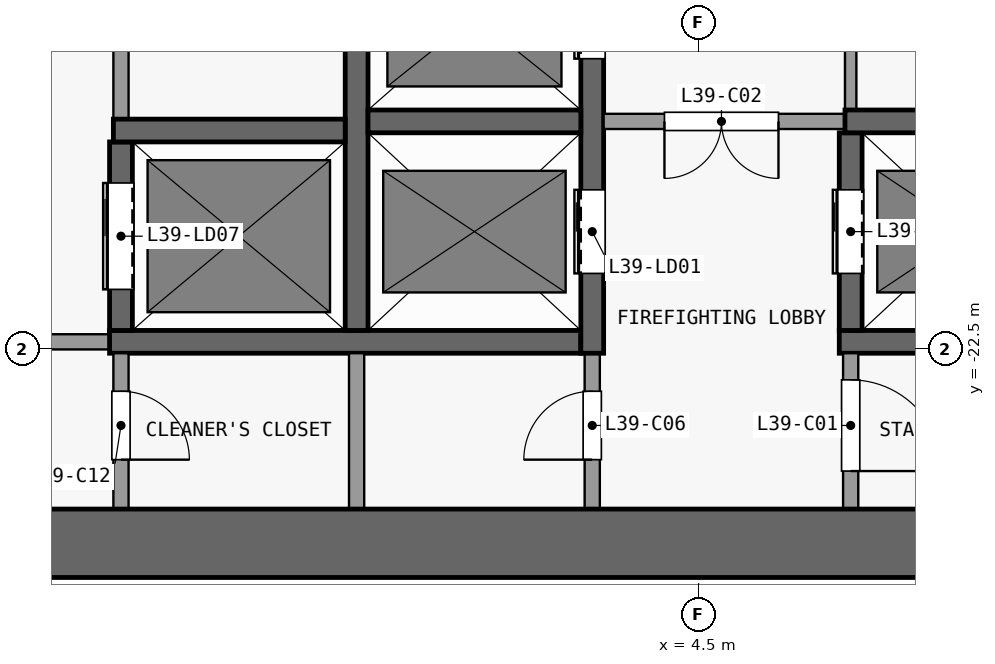
"""IFC4 building model, lengths in metres.
Left out: names, types, materials, properties, quantities, classifications, styles, units other than length and angle.
Written with IfcOpenShell. Run it as: python <this file> out.ifc"""

import sys

from ifc_helpers import new_model, si_unit, direction, frame, frame_2d, origin, place, context, subcontext, project, spatial, rectangle, extrude, element, fill, save


model = new_model("IFC4")
c1 = context("Model", 3, precision=1e-05, world=origin(), true_north=direction((0.0, 1.0)))
c2 = subcontext(c1, "Body", "Model", "MODEL_VIEW")
j1 = project(units=[si_unit("LENGTHUNIT", "METRE"), si_unit("PLANEANGLEUNIT", "RADIAN")], contexts=[c1])
p1 = place(None, origin())
s1 = spatial("IfcSite", under=j1, at=p1, CompositionType="ELEMENT")
p2 = place(p1, origin())
s2 = spatial("IfcBuilding", under=s1, at=p2, CompositionType="ELEMENT")
p3 = place(p2, frame((0.0, 0.0, 160.1)))
s3 = spatial("IfcBuildingStorey", under=s2, at=p3, CompositionType="ELEMENT", Elevation=160.1)
p4 = place(p3, frame((-13.3, -25.05, 0.0), z_axis=(0.0, 0.0, 1.0), x_axis=(1.0, 0.0, 0.0)))
e1 = element("IfcWall", 1, at=p4, inside=s3, PredefinedType="SHEAR", context=c2, shape_type="SweptSolid", body=[
    extrude(rectangle(XDim=26.6, YDim=0.9, at=frame_2d((13.3, 0.0))), origin(), (0.0, 0.0, 1.0), 3.3),
])
p5 = place(p3, frame((-3.25, -22.4, 0.0), z_axis=(0.0, 0.0, 1.0), x_axis=(-1.0, 0.0, 0.0)))
e2 = element("IfcWall", 2, at=p5, inside=s3, PredefinedType="PARTITIONING", context=c2, shape_type="SweptSolid", body=[
    extrude(rectangle(XDim=6.2, YDim=0.2, at=frame_2d((3.1, 0.0))), origin(), (0.0, 0.0, 1.0), 3.3),
])
p6 = place(p5, frame((0.8, 0.0, 0.0)))
e3 = element("IfcOpeningElement", 3, at=p6, cuts=e2, PredefinedType="OPENING", context=c2, shape_type="SweptSolid", body=[
    extrude(rectangle(XDim=1.5, YDim=2.1, at=frame_2d((0.75, 1.05))), frame((0.0, 0.11, 0.0), z_axis=(0.0, -1.0, 0.0), x_axis=(1.0, 0.0, 0.0)), (0.0, 0.0, 1.0), 0.22),
])
p7 = place(p3, frame((-3.25, -22.4, 0.0), z_axis=(0.0, 0.0, 1.0), x_axis=(1.0, 0.0, 0.0)))
e4 = element("IfcWall", 4, at=p7, inside=s3, PredefinedType="SHEAR", context=c2, shape_type="SweptSolid", body=[
    extrude(rectangle(XDim=6.2, YDim=0.3, at=frame_2d((3.1, 0.0))), origin(), (0.0, 0.0, 1.0), 3.3),
])
p8 = place(p3, frame((6.35, -22.4, 0.0), z_axis=(0.0, 0.0, 1.0), x_axis=(1.0, 0.0, 0.0)))
e5 = element("IfcWall", 5, at=p8, inside=s3, PredefinedType="SHEAR", context=c2, shape_type="SweptSolid", body=[
    extrude(rectangle(XDim=3.1, YDim=0.3, at=frame_2d((1.55, 0.0))), origin(), (0.0, 0.0, 1.0), 3.3),
])
p9 = place(p3, frame((-3.2, -19.62, 0.0), z_axis=(0.0, 0.0, 1.0), x_axis=(1.0, 0.0, 0.0)))
e6 = element("IfcWall", 6, at=p9, inside=s3, PredefinedType="SHEAR", context=c2, shape_type="SweptSolid", body=[
    extrude(rectangle(XDim=3.05, YDim=0.3, at=frame_2d((1.525, 0.0))), origin(), (0.0, 0.0, 1.0), 3.3),
])
p10 = place(p3, frame((0.15, -19.5, 0.0), z_axis=(0.0, 0.0, 1.0), x_axis=(1.0, 0.0, 0.0)))
e7 = element("IfcWall", 7, at=p10, inside=s3, PredefinedType="SHEAR", context=c2, shape_type="SweptSolid", body=[
    extrude(rectangle(XDim=2.8, YDim=0.3, at=frame_2d((1.4, 0.0))), origin(), (0.0, 0.0, 1.0), 3.3),
])
p11 = place(p3, frame((6.575, -19.5, 0.0), z_axis=(0.0, 0.0, 1.0), x_axis=(-1.0, 0.0, 0.0)))
e8 = element("IfcWall", 8, at=p11, inside=s3, PredefinedType="PARTITIONING", context=c2, shape_type="SweptSolid", body=[
    extrude(rectangle(XDim=3.325, YDim=0.2, at=frame_2d((1.663, 0.0))), origin(), (0.0, 0.0, 1.0), 3.3),
])
p12 = place(p11, frame((1.025, 0.0, 0.0)))
e9 = element("IfcOpeningElement", 9, at=p12, cuts=e8, PredefinedType="OPENING", context=c2, shape_type="SweptSolid", body=[
    extrude(rectangle(XDim=1.5, YDim=2.1, at=frame_2d((0.75, 1.05))), frame((0.0, 0.11, 0.0), z_axis=(0.0, -1.0, 0.0), x_axis=(1.0, 0.0, 0.0)), (0.0, 0.0, 1.0), 0.22),
])
p13 = place(p3, frame((6.425, -19.5, 0.0), z_axis=(0.0, 0.0, 1.0), x_axis=(1.0, 0.0, 0.0)))
e10 = element("IfcWall", 10, at=p13, inside=s3, PredefinedType="SHEAR", context=c2, shape_type="SweptSolid", body=[
    extrude(rectangle(XDim=3.025, YDim=0.3, at=frame_2d((1.512, 0.0))), origin(), (0.0, 0.0, 1.0), 3.3),
])
p14 = place(p3, frame((-3.1, -22.55, 0.0), z_axis=(0.0, 0.0, 1.0), x_axis=(0.0, -1.0, 0.0)))
e11 = element("IfcWall", 11, at=p14, inside=s3, PredefinedType="PARTITIONING", context=c2, shape_type="SweptSolid", body=[
    extrude(rectangle(XDim=2.05, YDim=0.2, at=frame_2d((1.025, 0.0))), origin(), (0.0, 0.0, 1.0), 3.3),
])
p15 = place(p14, frame((0.5, 0.0, 0.0)))
e12 = element("IfcOpeningElement", 12, at=p15, cuts=e11, PredefinedType="OPENING", context=c2, shape_type="SweptSolid", body=[
    extrude(rectangle(XDim=0.9, YDim=2.1, at=frame_2d((0.45, 1.05))), frame((0.0, 0.11, 0.0), z_axis=(0.0, -1.0, 0.0), x_axis=(1.0, 0.0, 0.0)), (0.0, 0.0, 1.0), 0.22),
])
p16 = place(p3, frame((-3.1, -22.25, 0.0), z_axis=(0.0, 0.0, 1.0), x_axis=(0.0, 1.0, 0.0)))
e13 = element("IfcWall", 13, at=p16, inside=s3, PredefinedType="SHEAR", context=c2, shape_type="SweptSolid", body=[
    extrude(rectangle(XDim=2.48, YDim=0.3, at=frame_2d((1.24, 0.0))), origin(), (0.0, 0.0, 1.0), 3.3),
])
p17 = place(p16, frame((0.54, 0.0, 0.0)))
e14 = element("IfcOpeningElement", 14, at=p17, cuts=e13, PredefinedType="OPENING", context=c2, shape_type="SweptSolid", body=[
    extrude(rectangle(XDim=1.4, YDim=2.1, at=frame_2d((0.7, 1.05))), frame((0.0, 0.16, 0.0), z_axis=(0.0, -1.0, 0.0), x_axis=(1.0, 0.0, 0.0)), (0.0, 0.0, 1.0), 0.32),
])
p18 = place(p3, frame((-3.1, -8.5, 0.0), z_axis=(0.0, 0.0, 1.0), x_axis=(0.0, -1.0, 0.0)))
e15 = element("IfcWall", 15, at=p18, inside=s3, PredefinedType="PARTITIONING", context=c2, shape_type="SweptSolid", body=[
    extrude(rectangle(XDim=10.97, YDim=0.2, at=frame_2d((5.485, 0.0))), origin(), (0.0, 0.0, 1.0), 3.3),
])
p19 = place(p18, frame((6.35, 0.0, 0.0)))
e16 = element("IfcOpeningElement", 16, at=p19, cuts=e15, PredefinedType="OPENING", context=c2, shape_type="SweptSolid", body=[
    extrude(rectangle(XDim=1.2, YDim=2.1, at=frame_2d((0.6, 1.05))), frame((0.0, 0.11, 0.0), z_axis=(0.0, -1.0, 0.0), x_axis=(1.0, 0.0, 0.0)), (0.0, 0.0, 1.0), 0.22),
])
p20 = place(p18, frame((0.94, 0.0, 0.0)))
e17 = element("IfcOpeningElement", 17, at=p20, cuts=e15, PredefinedType="OPENING", context=c2, shape_type="SweptSolid", body=[
    extrude(rectangle(XDim=0.9, YDim=2.1, at=frame_2d((0.45, 1.05))), frame((0.0, 0.11, 0.0), z_axis=(0.0, -1.0, 0.0), x_axis=(1.0, 0.0, 0.0)), (0.0, 0.0, 1.0), 0.22),
])
p21 = place(p3, frame((0.0, -24.6, 0.0), z_axis=(0.0, 0.0, 1.0), x_axis=(0.0, 1.0, 0.0)))
e18 = element("IfcWall", 18, at=p21, inside=s3, PredefinedType="PARTITIONING", context=c2, shape_type="SweptSolid", body=[
    extrude(rectangle(XDim=2.05, YDim=0.2, at=frame_2d((1.025, 0.0))), origin(), (0.0, 0.0, 1.0), 3.3),
])
p22 = place(p3, frame((0.0, -22.25, 0.0), z_axis=(0.0, 0.0, 1.0), x_axis=(0.0, 1.0, 0.0)))
e19 = element("IfcWall", 19, at=p22, inside=s3, PredefinedType="SHEAR", context=c2, shape_type="SweptSolid", body=[
    extrude(rectangle(XDim=13.75, YDim=0.3, at=frame_2d((6.875, 0.0))), origin(), (0.0, 0.0, 1.0), 3.3),
])
p23 = place(p3, frame((3.1, -24.6, 0.0), z_axis=(0.0, 0.0, 1.0), x_axis=(0.0, 1.0, 0.0)))
e20 = element("IfcWall", 20, at=p23, inside=s3, PredefinedType="PARTITIONING", context=c2, shape_type="SweptSolid", body=[
    extrude(rectangle(XDim=2.05, YDim=0.2, at=frame_2d((1.025, 0.0))), origin(), (0.0, 0.0, 1.0), 3.3),
])
p24 = place(p23, frame((0.65, 0.0, 0.0)))
e21 = element("IfcOpeningElement", 21, at=p24, cuts=e20, PredefinedType="OPENING", context=c2, shape_type="SweptSolid", body=[
    extrude(rectangle(XDim=0.9, YDim=2.1, at=frame_2d((0.45, 1.05))), frame((0.0, 0.11, 0.0), z_axis=(0.0, -1.0, 0.0), x_axis=(1.0, 0.0, 0.0)), (0.0, 0.0, 1.0), 0.22),
])
p25 = place(p3, frame((3.1, -22.55, 0.0), z_axis=(0.0, 0.0, 1.0), x_axis=(0.0, 1.0, 0.0)))
e22 = element("IfcWall", 22, at=p25, inside=s3, PredefinedType="SHEAR", context=c2, shape_type="SweptSolid", body=[
    extrude(rectangle(XDim=14.05, YDim=0.3, at=frame_2d((7.025, 0.0))), origin(), (0.0, 0.0, 1.0), 3.3),
])
p26 = place(p25, frame((1.05, 0.0, 0.0)))
e23 = element("IfcOpeningElement", 23, at=p26, cuts=e22, PredefinedType="OPENING", context=c2, shape_type="SweptSolid", body=[
    extrude(rectangle(XDim=1.1, YDim=2.1, at=frame_2d((0.55, 1.05))), frame((0.0, 0.16, 0.0), z_axis=(0.0, -1.0, 0.0), x_axis=(1.0, 0.0, 0.0)), (0.0, 0.0, 1.0), 0.32),
])
p27 = place(p25, frame((3.875, 0.0, 0.0)))
e24 = element("IfcOpeningElement", 24, at=p27, cuts=e22, PredefinedType="OPENING", context=c2, shape_type="SweptSolid", body=[
    extrude(rectangle(XDim=1.1, YDim=2.1, at=frame_2d((0.55, 1.05))), frame((0.0, 0.16, 0.0), z_axis=(0.0, -1.0, 0.0), x_axis=(1.0, 0.0, 0.0)), (0.0, 0.0, 1.0), 0.32),
])
p28 = place(p25, frame((6.625, 0.0, 0.0)))
e25 = element("IfcOpeningElement", 25, at=p28, cuts=e22, PredefinedType="OPENING", context=c2, shape_type="SweptSolid", body=[
    extrude(rectangle(XDim=1.1, YDim=2.1, at=frame_2d((0.55, 1.05))), frame((0.0, 0.16, 0.0), z_axis=(0.0, -1.0, 0.0), x_axis=(1.0, 0.0, 0.0)), (0.0, 0.0, 1.0), 0.32),
])
p29 = place(p25, frame((9.375, 0.0, 0.0)))
e26 = element("IfcOpeningElement", 26, at=p29, cuts=e22, PredefinedType="OPENING", context=c2, shape_type="SweptSolid", body=[
    extrude(rectangle(XDim=1.1, YDim=2.1, at=frame_2d((0.55, 1.05))), frame((0.0, 0.16, 0.0), z_axis=(0.0, -1.0, 0.0), x_axis=(1.0, 0.0, 0.0)), (0.0, 0.0, 1.0), 0.32),
])
p30 = place(p25, frame((12.125, 0.0, 0.0)))
e27 = element("IfcOpeningElement", 27, at=p30, cuts=e22, PredefinedType="OPENING", context=c2, shape_type="SweptSolid", body=[
    extrude(rectangle(XDim=1.1, YDim=2.1, at=frame_2d((0.55, 1.05))), frame((0.0, 0.16, 0.0), z_axis=(0.0, -1.0, 0.0), x_axis=(1.0, 0.0, 0.0)), (0.0, 0.0, 1.0), 0.32),
])
p31 = place(p3, frame((6.5, -22.55, 0.0), z_axis=(0.0, 0.0, 1.0), x_axis=(0.0, -1.0, 0.0)))
e28 = element("IfcWall", 28, at=p31, inside=s3, PredefinedType="PARTITIONING", context=c2, shape_type="SweptSolid", body=[
    extrude(rectangle(XDim=2.05, YDim=0.2, at=frame_2d((1.025, 0.0))), origin(), (0.0, 0.0, 1.0), 3.3),
])
p32 = place(p31, frame((0.35, 0.0, 0.0)))
e29 = element("IfcOpeningElement", 29, at=p32, cuts=e28, PredefinedType="OPENING", context=c2, shape_type="SweptSolid", body=[
    extrude(rectangle(XDim=1.2, YDim=2.1, at=frame_2d((0.6, 1.05))), frame((0.0, 0.11, 0.0), z_axis=(0.0, -1.0, 0.0), x_axis=(1.0, 0.0, 0.0)), (0.0, 0.0, 1.0), 0.22),
])
p33 = place(p3, frame((6.5, -22.25, 0.0), z_axis=(0.0, 0.0, 1.0), x_axis=(0.0, 1.0, 0.0)))
e30 = element("IfcWall", 30, at=p33, inside=s3, PredefinedType="SHEAR", context=c2, shape_type="SweptSolid", body=[
    extrude(rectangle(XDim=2.6, YDim=0.3, at=frame_2d((1.3, 0.0))), origin(), (0.0, 0.0, 1.0), 3.3),
])
p34 = place(p33, frame((0.75, 0.0, 0.0)))
e31 = element("IfcOpeningElement", 31, at=p34, cuts=e30, PredefinedType="OPENING", context=c2, shape_type="SweptSolid", body=[
    extrude(rectangle(XDim=1.1, YDim=2.1, at=frame_2d((0.55, 1.05))), frame((0.0, 0.16, 0.0), z_axis=(0.0, -1.0, 0.0), x_axis=(1.0, 0.0, 0.0)), (0.0, 0.0, 1.0), 0.32),
])
p35 = place(p3, frame((6.5, -8.5, 0.0), z_axis=(0.0, 0.0, 1.0), x_axis=(0.0, -1.0, 0.0)))
e32 = element("IfcWall", 32, at=p35, inside=s3, PredefinedType="PARTITIONING", context=c2, shape_type="SweptSolid", body=[
    extrude(rectangle(XDim=10.85, YDim=0.15, at=frame_2d((5.425, 0.0))), origin(), (0.0, 0.0, 1.0), 3.3),
])
p36 = place(p35, frame((7.65, 0.0, 0.0)))
e33 = element("IfcOpeningElement", 33, at=p36, cuts=e32, PredefinedType="OPENING", context=c2, shape_type="SweptSolid", body=[
    extrude(rectangle(XDim=1.2, YDim=2.1, at=frame_2d((0.6, 1.05))), frame((0.0, 0.085, 0.0), z_axis=(0.0, -1.0, 0.0), x_axis=(1.0, 0.0, 0.0)), (0.0, 0.0, 1.0), 0.17),
])
p37 = place(p35, frame((2.15, 0.0, 0.0)))
e34 = element("IfcOpeningElement", 34, at=p37, cuts=e32, PredefinedType="OPENING", context=c2, shape_type="SweptSolid", body=[
    extrude(rectangle(XDim=1.2, YDim=2.1, at=frame_2d((0.6, 1.05))), frame((0.0, 0.085, 0.0), z_axis=(0.0, -1.0, 0.0), x_axis=(1.0, 0.0, 0.0)), (0.0, 0.0, 1.0), 0.17),
])
p38 = place(p26, origin())
e35 = element("IfcDoor", 35, at=p38, inside=s3, OperationType="DOUBLE_DOOR_SLIDING", PredefinedType="DOOR", context=c2, shape_type="SweptSolid", body=[
    extrude(rectangle(XDim=1.1, YDim=2.1, at=frame_2d((0.55, 1.05))), frame((0.0, 0.025, 0.0), z_axis=(0.0, -1.0, 0.0), x_axis=(1.0, 0.0, 0.0)), (0.0, 0.0, 1.0), 0.05),
])
fill(e23, e35)
p39 = place(p34, origin())
e36 = element("IfcDoor", 36, at=p39, inside=s3, OperationType="DOUBLE_DOOR_SLIDING", PredefinedType="DOOR", context=c2, shape_type="SweptSolid", body=[
    extrude(rectangle(XDim=1.1, YDim=2.1, at=frame_2d((0.55, 1.05))), frame((0.0, 0.025, 0.0), z_axis=(0.0, -1.0, 0.0), x_axis=(1.0, 0.0, 0.0)), (0.0, 0.0, 1.0), 0.05),
])
fill(e31, e36)
p40 = place(p27, origin())
e37 = element("IfcDoor", 37, at=p40, inside=s3, OperationType="DOUBLE_DOOR_SLIDING", PredefinedType="DOOR", context=c2, shape_type="SweptSolid", body=[
    extrude(rectangle(XDim=1.1, YDim=2.1, at=frame_2d((0.55, 1.05))), frame((0.0, 0.025, 0.0), z_axis=(0.0, -1.0, 0.0), x_axis=(1.0, 0.0, 0.0)), (0.0, 0.0, 1.0), 0.05),
])
fill(e24, e37)
p41 = place(p17, origin())
e38 = element("IfcDoor", 38, at=p41, inside=s3, OperationType="DOUBLE_DOOR_SLIDING", PredefinedType="DOOR", context=c2, shape_type="SweptSolid", body=[
    extrude(rectangle(XDim=1.4, YDim=2.1, at=frame_2d((0.7, 1.05))), frame((0.0, 0.025, 0.0), z_axis=(0.0, -1.0, 0.0), x_axis=(1.0, 0.0, 0.0)), (0.0, 0.0, 1.0), 0.05),
])
fill(e14, e38)
p42 = place(p32, origin())
e39 = element("IfcDoor", 39, at=p42, inside=s3, OperationType="SINGLE_SWING_RIGHT", PredefinedType="DOOR", context=c2, shape_type="SweptSolid", body=[
    extrude(rectangle(XDim=1.2, YDim=2.1, at=frame_2d((0.6, 1.05))), frame((0.0, 0.025, 0.0), z_axis=(0.0, -1.0, 0.0), x_axis=(1.0, 0.0, 0.0)), (0.0, 0.0, 1.0), 0.05),
])
fill(e29, e39)
p43 = place(p12, origin())
e40 = element("IfcDoor", 40, at=p43, inside=s3, OperationType="DOUBLE_DOOR_SINGLE_SWING", PredefinedType="DOOR", context=c2, shape_type="SweptSolid", body=[
    extrude(rectangle(XDim=1.5, YDim=2.1, at=frame_2d((0.75, 1.05))), frame((0.0, 0.025, 0.0), z_axis=(0.0, -1.0, 0.0), x_axis=(1.0, 0.0, 0.0)), (0.0, 0.0, 1.0), 0.05),
])
fill(e9, e40)
p44 = place(p24, origin())
e41 = element("IfcDoor", 41, at=p44, inside=s3, OperationType="SINGLE_SWING_LEFT", PredefinedType="DOOR", context=c2, shape_type="SweptSolid", body=[
    extrude(rectangle(XDim=0.9, YDim=2.1, at=frame_2d((0.45, 1.05))), frame((0.0, 0.025, 0.0), z_axis=(0.0, -1.0, 0.0), x_axis=(1.0, 0.0, 0.0)), (0.0, 0.0, 1.0), 0.05),
])
fill(e21, e41)
p45 = place(p15, origin())
e42 = element("IfcDoor", 42, at=p45, inside=s3, OperationType="SINGLE_SWING_RIGHT", PredefinedType="DOOR", context=c2, shape_type="SweptSolid", body=[
    extrude(rectangle(XDim=0.9, YDim=2.1, at=frame_2d((0.45, 1.05))), frame((0.0, 0.025, 0.0), z_axis=(0.0, -1.0, 0.0), x_axis=(1.0, 0.0, 0.0)), (0.0, 0.0, 1.0), 0.05),
])
fill(e12, e42)
save(model, sys.argv[1])
